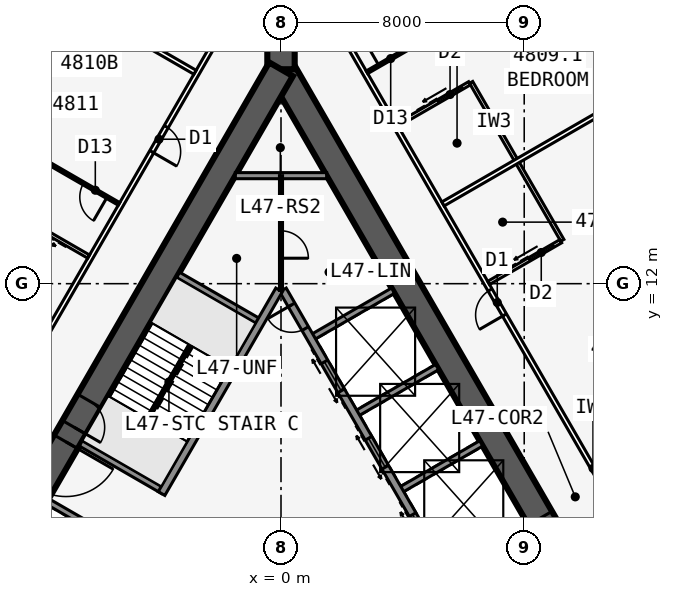
"""IFC4 building model, lengths in metres.
Left out: names, types, materials, properties, quantities, classifications, styles, units other than length and angle.
Written with IfcOpenShell. Run it as: python <this file> out.ifc"""

import sys

from ifc_helpers import new_model, si_unit, direction, frame, frame_2d, origin, place, context, subcontext, project, spatial, rectangle, extrude, element, fill, save


model = new_model("IFC4")
c1 = context("Model", 3, precision=1e-05, world=origin(), true_north=direction((0.0, 1.0)))
c2 = subcontext(c1, "Body", "Model", "MODEL_VIEW")
j1 = project(units=[si_unit("LENGTHUNIT", "METRE"), si_unit("PLANEANGLEUNIT", "RADIAN")], contexts=[c1])
p1 = place(None, origin())
s1 = spatial("IfcSite", under=j1, at=p1, CompositionType="ELEMENT")
p2 = place(p1, origin())
s2 = spatial("IfcBuilding", under=s1, at=p2, CompositionType="ELEMENT")
p3 = place(p2, frame((0.0, 0.0, 175.9)))
s3 = spatial("IfcBuildingStorey", under=s2, at=p3, CompositionType="ELEMENT", Elevation=175.9)
p4 = place(p3, frame((16.5, -9.526, 0.0), z_axis=(0.0, 0.0, 1.0), x_axis=(-0.499999749417, 0.866025548458, 0.0)))
e1 = element("IfcWall", 1, at=p4, inside=s3, PredefinedType="SHEAR", context=c2, shape_type="SweptSolid", body=[
    extrude(rectangle(XDim=33.0, YDim=0.9, at=frame_2d((16.5, 0.0))), origin(), (0.0, 0.0, 1.0), 3.4),
])
p5 = place(p4, frame((14.15, 0.0, 0.0)))
e2 = element("IfcOpeningElement", 2, at=p5, cuts=e1, PredefinedType="OPENING", context=c2, shape_type="SweptSolid", body=[
    extrude(rectangle(XDim=1.8, YDim=2.13, at=frame_2d((0.9, 1.065))), frame((0.0, 0.46, 0.0), z_axis=(0.0, -1.0, 0.0), x_axis=(1.0, 0.0, 0.0)), (0.0, 0.0, 1.0), 0.92),
])
p6 = place(p4, frame((12.6, 0.0, 0.0)))
e3 = element("IfcOpeningElement", 3, at=p6, cuts=e1, PredefinedType="OPENING", context=c2, shape_type="SweptSolid", body=[
    extrude(rectangle(XDim=1.0, YDim=2.13, at=frame_2d((0.5, 1.065))), frame((0.0, 0.46, 0.0), z_axis=(0.0, -1.0, 0.0), x_axis=(1.0, 0.0, 0.0)), (0.0, 0.0, 1.0), 0.92),
])
p7 = place(p3, frame((5.379, 2.586, 0.0), z_axis=(0.0, 0.0, 1.0), x_axis=(-0.500001375892, 0.866024609411, 0.0)))
e4 = element("IfcWall", 4, at=p7, inside=s3, PredefinedType="SOLIDWALL", context=c2, shape_type="SweptSolid", body=[
    extrude(rectangle(XDim=10.633, YDim=0.25, at=frame_2d((5.316, 0.0))), origin(), (0.0, 0.0, 1.0), 3.235),
])
p8 = place(p7, frame((9.164, 0.0, 0.0)))
e5 = element("IfcOpeningElement", 5, at=p8, cuts=e4, PredefinedType="OPENING", context=c2, shape_type="SweptSolid", body=[
    extrude(rectangle(XDim=0.9, YDim=2.13, at=frame_2d((0.45, 1.065))), frame((0.0, 0.135, 0.0), z_axis=(0.0, -1.0, 0.0), x_axis=(1.0, 0.0, 0.0)), (0.0, 0.0, 1.0), 0.27),
])
p9 = place(p7, frame((1.0, 0.0, 0.0)))
e6 = element("IfcOpeningElement", 6, at=p9, cuts=e4, PredefinedType="OPENING", context=c2, shape_type="SweptSolid", body=[
    extrude(rectangle(XDim=1.1, YDim=2.13, at=frame_2d((0.55, 1.065))), frame((0.0, 0.135, 0.0), z_axis=(0.0, -1.0, 0.0), x_axis=(1.0, 0.0, 0.0)), (0.0, 0.0, 1.0), 0.27),
])
p10 = place(p7, frame((3.9, 0.0, 0.0)))
e7 = element("IfcOpeningElement", 7, at=p10, cuts=e4, PredefinedType="OPENING", context=c2, shape_type="SweptSolid", body=[
    extrude(rectangle(XDim=1.1, YDim=2.13, at=frame_2d((0.55, 1.065))), frame((0.0, 0.135, 0.0), z_axis=(0.0, -1.0, 0.0), x_axis=(1.0, 0.0, 0.0)), (0.0, 0.0, 1.0), 0.27),
])
p11 = place(p7, frame((6.8, 0.0, 0.0)))
e8 = element("IfcOpeningElement", 8, at=p11, cuts=e4, PredefinedType="OPENING", context=c2, shape_type="SweptSolid", body=[
    extrude(rectangle(XDim=1.1, YDim=2.13, at=frame_2d((0.55, 1.065))), frame((0.0, 0.135, 0.0), z_axis=(0.0, -1.0, 0.0), x_axis=(1.0, 0.0, 0.0)), (0.0, 0.0, 1.0), 0.27),
])
for number, where, z_axis, x_axis in (
    (9, (3.879, 5.184, 0.0), (0.0, 0.0, 1.0), (0.866, 0.5, 0.0)),
    (10, (2.429, 7.696, 0.0), (0.0, 0.0, 1.0), (0.866, 0.5, 0.0)),
    (11, (0.979, 10.207, 0.0), (0.0, 0.0, 1.0), (0.866, 0.5, 0.0)),
):
    element("IfcWall", number, at=place(p3, frame(where, z_axis=z_axis, x_axis=x_axis)), inside=s3, PredefinedType="SOLIDWALL", context=c2, shape_type="SweptSolid", body=[
        extrude(rectangle(XDim=3.125, YDim=0.2, at=frame_2d((1.562, 0.0))), origin(), (0.0, 0.0, 1.0), 3.235),
    ])
p12 = place(p3, frame((0.0, 19.052, 0.0), z_axis=(0.0, 0.0, 1.0), x_axis=(-0.499999749417, -0.866025548458, 0.0)))
e12 = element("IfcWall", 12, at=p12, inside=s3, PredefinedType="SHEAR", context=c2, shape_type="SweptSolid", body=[
    extrude(rectangle(XDim=33.0, YDim=0.9, at=frame_2d((16.5, 0.0))), origin(), (0.0, 0.0, 1.0), 3.4),
])
p13 = place(p12, frame((14.15, 0.0, 0.0)))
e13 = element("IfcOpeningElement", 13, at=p13, cuts=e12, PredefinedType="OPENING", context=c2, shape_type="SweptSolid", body=[
    extrude(rectangle(XDim=1.8, YDim=2.13, at=frame_2d((0.9, 1.065))), frame((0.0, 0.46, 0.0), z_axis=(0.0, -1.0, 0.0), x_axis=(1.0, 0.0, 0.0)), (0.0, 0.0, 1.0), 0.92),
])
p14 = place(p12, frame((12.6, 0.0, 0.0)))
e14 = element("IfcOpeningElement", 14, at=p14, cuts=e12, PredefinedType="OPENING", context=c2, shape_type="SweptSolid", body=[
    extrude(rectangle(XDim=1.0, YDim=2.13, at=frame_2d((0.5, 1.065))), frame((0.0, 0.46, 0.0), z_axis=(0.0, -1.0, 0.0), x_axis=(1.0, 0.0, 0.0)), (0.0, 0.0, 1.0), 0.92),
])
p15 = place(p3, frame((-0.062, 11.794, 0.0), z_axis=(0.0, 0.0, 1.0), x_axis=(-0.500006680225, -0.86602154692, 0.0)))
e15 = element("IfcWall", 15, at=p15, inside=s3, PredefinedType="SOLIDWALL", context=c2, shape_type="SweptSolid", body=[
    extrude(rectangle(XDim=7.733, YDim=0.25, at=frame_2d((3.866, 0.0))), origin(), (0.0, 0.0, 1.0), 3.235),
])
for number, where, z_axis, x_axis in (
    (16, (-0.679, 10.727, 0.0), (0.0, 0.0, 1.0), (-0.866, 0.5, 0.0)),
    (17, (-3.879, 5.184, 0.0), (0.0, 0.0, 1.0), (-0.866, 0.5, 0.0)),
    (18, (-4.979, 3.279, 0.0), (0.0, 0.0, 1.0), (-0.866, 0.5, 0.0)),
):
    element("IfcWall", number, at=place(p3, frame(where, z_axis=z_axis, x_axis=x_axis)), inside=s3, PredefinedType="SOLIDWALL", context=c2, shape_type="SweptSolid", body=[
        extrude(rectangle(XDim=3.125, YDim=0.2, at=frame_2d((1.562, 0.0))), origin(), (0.0, 0.0, 1.0), 3.235),
    ])
p16 = place(p3, frame((0.0, 19.052, 0.0), z_axis=(0.0, 0.0, 1.0), x_axis=(0.0, 1.0, 0.0)))
e19 = element("IfcWall", 19, at=p16, inside=s3, PredefinedType="SHEAR", context=c2, shape_type="SweptSolid", body=[
    extrude(rectangle(XDim=4.746, YDim=0.9, at=frame_2d((2.373, 0.0))), origin(), (0.0, 0.0, 1.0), 3.4),
])
p17 = place(p16, frame((1.8, 0.0, 0.0)))
e20 = element("IfcOpeningElement", 20, at=p17, cuts=e19, PredefinedType="OPENING", context=c2, shape_type="SweptSolid", body=[
    extrude(rectangle(XDim=1.8, YDim=2.13, at=frame_2d((0.9, 1.065))), frame((0.0, 0.46, 0.0), z_axis=(0.0, -1.0, 0.0), x_axis=(1.0, 0.0, 0.0)), (0.0, 0.0, 1.0), 0.92),
])
p18 = place(p3, frame((12.723, 18.868, 0.0), z_axis=(0.0, 0.0, 1.0), x_axis=(-0.641810386606, 0.766863369607, 0.0)))
e21 = element("IfcWall", 21, at=p18, inside=s3, PredefinedType="STANDARD", context=c2, shape_type="SweptSolid", body=[
    extrude(rectangle(XDim=5.076, YDim=0.25, at=frame_2d((2.538, 0.0))), origin(), (0.0, 0.0, 1.0), 3.235),
])
p19 = place(p18, frame((0.738, 0.0, 0.45)))
e22 = element("IfcOpeningElement", 22, at=p19, cuts=e21, PredefinedType="OPENING", context=c2, shape_type="SweptSolid", body=[
    extrude(rectangle(XDim=3.6, YDim=2.4, at=frame_2d((1.8, 1.2))), frame((0.0, 0.135, 0.0), z_axis=(0.0, -1.0, 0.0), x_axis=(1.0, 0.0, 0.0)), (0.0, 0.0, 1.0), 0.27),
])
p20 = place(p3, frame((20.027, -10.985, 0.0), z_axis=(0.0, 0.0, 1.0), x_axis=(-0.500001677587, 0.866024435227, 0.0)))
e23 = element("IfcWall", 23, at=p20, inside=s3, PredefinedType="PARTITIONING", context=c2, shape_type="SweptSolid", body=[
    extrude(rectangle(XDim=39.054, YDim=0.15, at=frame_2d((19.527, 0.0))), origin(), (0.0, 0.0, 1.0), 3.235),
])
p21 = place(p20, frame((1.558, 0.0, 0.0)))
e24 = element("IfcOpeningElement", 24, at=p21, cuts=e23, PredefinedType="OPENING", context=c2, shape_type="SweptSolid", body=[
    extrude(rectangle(XDim=0.95, YDim=2.13, at=frame_2d((0.475, 1.065))), frame((0.0, 0.085, 0.0), z_axis=(0.0, -1.0, 0.0), x_axis=(1.0, 0.0, 0.0)), (0.0, 0.0, 1.0), 0.17),
])
p22 = place(p20, frame((11.552, 0.0, 0.0)))
e25 = element("IfcOpeningElement", 25, at=p22, cuts=e23, PredefinedType="OPENING", context=c2, shape_type="SweptSolid", body=[
    extrude(rectangle(XDim=0.95, YDim=2.13, at=frame_2d((0.475, 1.065))), frame((0.0, 0.085, 0.0), z_axis=(0.0, -1.0, 0.0), x_axis=(1.0, 0.0, 0.0)), (0.0, 0.0, 1.0), 0.17),
])
p23 = place(p20, frame((25.352, 0.0, 0.0)))
e26 = element("IfcOpeningElement", 26, at=p23, cuts=e23, PredefinedType="OPENING", context=c2, shape_type="SweptSolid", body=[
    extrude(rectangle(XDim=0.95, YDim=2.13, at=frame_2d((0.475, 1.065))), frame((0.0, 0.085, 0.0), z_axis=(0.0, -1.0, 0.0), x_axis=(1.0, 0.0, 0.0)), (0.0, 0.0, 1.0), 0.17),
])
p24 = place(p20, frame((36.546, 0.0, 0.0)))
e27 = element("IfcOpeningElement", 27, at=p24, cuts=e23, PredefinedType="OPENING", context=c2, shape_type="SweptSolid", body=[
    extrude(rectangle(XDim=0.95, YDim=2.13, at=frame_2d((0.475, 1.065))), frame((0.0, 0.085, 0.0), z_axis=(0.0, -1.0, 0.0), x_axis=(1.0, 0.0, 0.0)), (0.0, 0.0, 1.0), 0.17),
])
p25 = place(p3, frame((5.329, 14.623, 0.0), z_axis=(0.0, 0.0, 1.0), x_axis=(0.866011723728, 0.500023693804, 0.0)))
e28 = element("IfcWall", 28, at=p25, inside=s3, PredefinedType="PARTITIONING", context=c2, shape_type="SweptSolid", body=[
    extrude(rectangle(XDim=8.395, YDim=0.15, at=frame_2d((4.198, 0.0))), origin(), (0.0, 0.0, 1.0), 2.389),
])
p26 = place(p3, frame((2.829, 18.954, 0.0), z_axis=(0.0, 0.0, 1.0), x_axis=(0.866015739374, 0.500016738876, 0.0)))
e29 = element("IfcWall", 29, at=p26, inside=s3, PredefinedType="PARTITIONING", context=c2, shape_type="SweptSolid", body=[
    extrude(rectangle(XDim=7.516, YDim=0.1, at=frame_2d((3.758, 0.0))), origin(), (0.0, 0.0, 1.0), 2.389),
])
p27 = place(p26, frame((0.45, 0.0, 0.0)))
e30 = element("IfcOpeningElement", 30, at=p27, cuts=e29, PredefinedType="OPENING", context=c2, shape_type="SweptSolid", body=[
    extrude(rectangle(XDim=0.9, YDim=2.13, at=frame_2d((0.45, 1.065))), frame((0.0, 0.06, 0.0), z_axis=(0.0, -1.0, 0.0), x_axis=(1.0, 0.0, 0.0)), (0.0, 0.0, 1.0), 0.12),
])
p28 = place(p3, frame((9.253, 13.425, 0.0), z_axis=(0.0, 0.0, 1.0), x_axis=(-0.499990139034, 0.866031096941, 0.0)))
e31 = element("IfcWall", 31, at=p28, inside=s3, PredefinedType="PLUMBINGWALL", context=c2, shape_type="SweptSolid", body=[
    extrude(rectangle(XDim=3.0, YDim=0.12, at=frame_2d((1.5, 0.0))), origin(), (0.0, 0.0, 1.0), 3.235),
])
p29 = place(p3, frame((6.829, 12.025, 0.0), z_axis=(0.0, 0.0, 1.0), x_axis=(0.866035715982, 0.499982138324, 0.0)))
e32 = element("IfcWall", 32, at=p29, inside=s3, PredefinedType="PLUMBINGWALL", context=c2, shape_type="SweptSolid", body=[
    extrude(rectangle(XDim=2.74, YDim=0.12, at=frame_2d((1.37, 0.0))), origin(), (0.0, 0.0, 1.0), 3.235),
])
p30 = place(p29, frame((1.55, 0.0, 0.0)))
e33 = element("IfcOpeningElement", 33, at=p30, cuts=e32, PredefinedType="OPENING", context=c2, shape_type="SweptSolid", body=[
    extrude(rectangle(XDim=0.9, YDim=2.13, at=frame_2d((0.45, 1.065))), frame((0.0, 0.07, 0.0), z_axis=(0.0, -1.0, 0.0), x_axis=(1.0, 0.0, 0.0)), (0.0, 0.0, 1.0), 0.14),
])
p31 = place(p3, frame((7.753, 16.023, 0.0), z_axis=(0.0, 0.0, 1.0), x_axis=(-0.499990139034, 0.866031096941, 0.0)))
e34 = element("IfcWall", 34, at=p31, inside=s3, PredefinedType="PLUMBINGWALL", context=c2, shape_type="SweptSolid", body=[
    extrude(rectangle(XDim=3.0, YDim=0.12, at=frame_2d((1.5, 0.0))), origin(), (0.0, 0.0, 1.0), 3.235),
])
p32 = place(p3, frame((3.829, 17.221, 0.0), z_axis=(0.0, 0.0, 1.0), x_axis=(0.865997131366, 0.500048966069, 0.0)))
e35 = element("IfcWall", 35, at=p32, inside=s3, PredefinedType="PLUMBINGWALL", context=c2, shape_type="SweptSolid", body=[
    extrude(rectangle(XDim=2.74, YDim=0.12, at=frame_2d((1.37, 0.0))), origin(), (0.0, 0.0, 1.0), 3.235),
])
p33 = place(p32, frame((1.55, 0.0, 0.0)))
e36 = element("IfcOpeningElement", 36, at=p33, cuts=e35, PredefinedType="OPENING", context=c2, shape_type="SweptSolid", body=[
    extrude(rectangle(XDim=0.9, YDim=2.13, at=frame_2d((0.45, 1.065))), frame((0.0, 0.07, 0.0), z_axis=(0.0, -1.0, 0.0), x_axis=(1.0, 0.0, 0.0)), (0.0, 0.0, 1.0), 0.14),
])
p34 = place(p3, frame((-0.5, 22.836, 0.0), z_axis=(0.0, 0.0, 1.0), x_axis=(-0.500001677587, -0.866024435227, 0.0)))
e37 = element("IfcWall", 37, at=p34, inside=s3, PredefinedType="PARTITIONING", context=c2, shape_type="SweptSolid", body=[
    extrude(rectangle(XDim=39.054, YDim=0.15, at=frame_2d((19.527, 0.0))), origin(), (0.0, 0.0, 1.0), 3.235),
])
p35 = place(p34, frame((0.352, 0.0, 0.0)))
e38 = element("IfcOpeningElement", 38, at=p35, cuts=e37, PredefinedType="OPENING", context=c2, shape_type="SweptSolid", body=[
    extrude(rectangle(XDim=0.95, YDim=2.13, at=frame_2d((0.475, 1.065))), frame((0.0, 0.085, 0.0), z_axis=(0.0, -1.0, 0.0), x_axis=(1.0, 0.0, 0.0)), (0.0, 0.0, 1.0), 0.17),
])
p36 = place(p34, frame((6.552, 0.0, 0.0)))
e39 = element("IfcOpeningElement", 39, at=p36, cuts=e37, PredefinedType="OPENING", context=c2, shape_type="SweptSolid", body=[
    extrude(rectangle(XDim=0.95, YDim=2.13, at=frame_2d((0.475, 1.065))), frame((0.0, 0.085, 0.0), z_axis=(0.0, -1.0, 0.0), x_axis=(1.0, 0.0, 0.0)), (0.0, 0.0, 1.0), 0.17),
])
p37 = place(p34, frame((15.952, 0.0, 0.0)))
e40 = element("IfcOpeningElement", 40, at=p37, cuts=e37, PredefinedType="OPENING", context=c2, shape_type="SweptSolid", body=[
    extrude(rectangle(XDim=0.95, YDim=2.13, at=frame_2d((0.475, 1.065))), frame((0.0, 0.085, 0.0), z_axis=(0.0, -1.0, 0.0), x_axis=(1.0, 0.0, 0.0)), (0.0, 0.0, 1.0), 0.17),
])
p38 = place(p34, frame((21.552, 0.0, 0.0)))
e41 = element("IfcOpeningElement", 41, at=p38, cuts=e37, PredefinedType="OPENING", context=c2, shape_type="SweptSolid", body=[
    extrude(rectangle(XDim=0.95, YDim=2.13, at=frame_2d((0.475, 1.065))), frame((0.0, 0.085, 0.0), z_axis=(0.0, -1.0, 0.0), x_axis=(1.0, 0.0, 0.0)), (0.0, 0.0, 1.0), 0.17),
])
p39 = place(p34, frame((30.952, 0.0, 0.0)))
e42 = element("IfcOpeningElement", 42, at=p39, cuts=e37, PredefinedType="OPENING", context=c2, shape_type="SweptSolid", body=[
    extrude(rectangle(XDim=0.95, YDim=2.13, at=frame_2d((0.475, 1.065))), frame((0.0, 0.085, 0.0), z_axis=(0.0, -1.0, 0.0), x_axis=(1.0, 0.0, 0.0)), (0.0, 0.0, 1.0), 0.17),
])
p40 = place(p34, frame((37.752, 0.0, 0.0)))
e43 = element("IfcOpeningElement", 43, at=p40, cuts=e37, PredefinedType="OPENING", context=c2, shape_type="SweptSolid", body=[
    extrude(rectangle(XDim=0.95, YDim=2.13, at=frame_2d((0.475, 1.065))), frame((0.0, 0.085, 0.0), z_axis=(0.0, -1.0, 0.0), x_axis=(1.0, 0.0, 0.0)), (0.0, 0.0, 1.0), 0.17),
])
p41 = place(p3, frame((-2.829, 18.954, 0.0), z_axis=(0.0, 0.0, 1.0), x_axis=(-0.866015739374, 0.500016738876, 0.0)))
e44 = element("IfcWall", 44, at=p41, inside=s3, PredefinedType="PARTITIONING", context=c2, shape_type="SweptSolid", body=[
    extrude(rectangle(XDim=7.516, YDim=0.15, at=frame_2d((3.758, 0.0))), origin(), (0.0, 0.0, 1.0), 2.389),
])
p42 = place(p3, frame((-5.329, 14.623, 0.0), z_axis=(0.0, 0.0, 1.0), x_axis=(-0.866011723728, 0.500023693804, 0.0)))
e45 = element("IfcWall", 45, at=p42, inside=s3, PredefinedType="PARTITIONING", context=c2, shape_type="SweptSolid", body=[
    extrude(rectangle(XDim=8.395, YDim=0.1, at=frame_2d((4.198, 0.0))), origin(), (0.0, 0.0, 1.0), 2.389),
])
p43 = place(p42, frame((0.45, 0.0, 0.0)))
e46 = element("IfcOpeningElement", 46, at=p43, cuts=e45, PredefinedType="OPENING", context=c2, shape_type="SweptSolid", body=[
    extrude(rectangle(XDim=0.9, YDim=2.13, at=frame_2d((0.45, 1.065))), frame((0.0, 0.06, 0.0), z_axis=(0.0, -1.0, 0.0), x_axis=(1.0, 0.0, 0.0)), (0.0, 0.0, 1.0), 0.12),
])
p44 = place(p3, frame((-6.329, 12.891, 0.0), z_axis=(0.0, 0.0, 1.0), x_axis=(-0.866035715982, 0.499982138324, 0.0)))
e47 = element("IfcWall", 47, at=p44, inside=s3, PredefinedType="PLUMBINGWALL", context=c2, shape_type="SweptSolid", body=[
    extrude(rectangle(XDim=2.74, YDim=0.12, at=frame_2d((1.37, 0.0))), origin(), (0.0, 0.0, 1.0), 3.235),
])
p45 = place(p44, frame((1.55, 0.0, 0.0)))
e48 = element("IfcOpeningElement", 48, at=p45, cuts=e47, PredefinedType="OPENING", context=c2, shape_type="SweptSolid", body=[
    extrude(rectangle(XDim=0.9, YDim=2.13, at=frame_2d((0.45, 1.065))), frame((0.0, 0.07, 0.0), z_axis=(0.0, -1.0, 0.0), x_axis=(1.0, 0.0, 0.0)), (0.0, 0.0, 1.0), 0.14),
])
p46 = place(p3, frame((-1.501, 15.552, 0.0), z_axis=(0.0, 0.0, 1.0), x_axis=(1.0, 0.0, 0.0)))
e49 = element("IfcWall", 49, at=p46, inside=s3, PredefinedType="SOLIDWALL", context=c2, shape_type="SweptSolid", body=[
    extrude(rectangle(XDim=3.002, YDim=0.2, at=frame_2d((1.501, 0.0))), origin(), (0.0, 0.0, 1.0), 3.235),
])
p47 = place(p3, frame((0.0, 15.552, 0.0), z_axis=(0.0, 0.0, 1.0), x_axis=(0.0, -1.0, 0.0)))
e50 = element("IfcWall", 50, at=p47, inside=s3, PredefinedType="PARTITIONING", context=c2, shape_type="SweptSolid", body=[
    extrude(rectangle(XDim=3.775, YDim=0.1, at=frame_2d((1.888, 0.0))), origin(), (0.0, 0.0, 1.0), 3.235),
])
p48 = place(p47, frame((1.815, 0.0, 0.0)))
e51 = element("IfcOpeningElement", 51, at=p48, cuts=e50, PredefinedType="OPENING", context=c2, shape_type="SweptSolid", body=[
    extrude(rectangle(XDim=0.9, YDim=2.13, at=frame_2d((0.45, 1.065))), frame((0.0, 0.06, 0.0), z_axis=(0.0, -1.0, 0.0), x_axis=(1.0, 0.0, 0.0)), (0.0, 0.0, 1.0), 0.12),
])
p49 = place(p3, frame((-2.988, 9.978, 0.0), z_axis=(0.0, 0.0, 1.0), x_axis=(-0.499992232847, -0.866029888106, 0.0)))
e52 = element("IfcWall", 52, at=p49, inside=s3, PredefinedType="SOLIDWALL", context=c2, shape_type="SweptSolid", body=[
    extrude(rectangle(XDim=2.794, YDim=0.1, at=frame_2d((1.397, 0.0))), origin(), (0.0, 0.0, 1.0), 3.4),
])
p50 = place(p19, origin())
e53 = element("IfcWindow", 53, at=p50, inside=s3, PartitioningType="SINGLE_PANEL", PredefinedType="WINDOW", context=c2, shape_type="SweptSolid", body=[
    extrude(rectangle(XDim=3.6, YDim=2.4, at=frame_2d((1.8, 1.2))), frame((0.0, 0.03, 0.0), z_axis=(0.0, -1.0, 0.0), x_axis=(1.0, 0.0, 0.0)), (0.0, 0.0, 1.0), 0.06),
])
fill(e22, e53)
p51 = place(p27, origin())
e54 = element("IfcDoor", 54, at=p51, inside=s3, OperationType="SINGLE_SWING_LEFT", PredefinedType="DOOR", context=c2, shape_type="SweptSolid", body=[
    extrude(rectangle(XDim=0.9, YDim=2.13, at=frame_2d((0.45, 1.065))), frame((0.0, 0.025, 0.0), z_axis=(0.0, -1.0, 0.0), x_axis=(1.0, 0.0, 0.0)), (0.0, 0.0, 1.0), 0.05),
])
fill(e30, e54)
p52 = place(p30, origin())
e55 = element("IfcDoor", 55, at=p52, inside=s3, OperationType="SLIDING_TO_LEFT", PredefinedType="DOOR", context=c2, shape_type="SweptSolid", body=[
    extrude(rectangle(XDim=0.9, YDim=2.13, at=frame_2d((0.45, 1.065))), frame((0.0, 0.025, 0.0), z_axis=(0.0, -1.0, 0.0), x_axis=(1.0, 0.0, 0.0)), (0.0, 0.0, 1.0), 0.05),
])
fill(e33, e55)
p53 = place(p23, origin())
e56 = element("IfcDoor", 56, at=p53, inside=s3, OperationType="SINGLE_SWING_LEFT", PredefinedType="DOOR", context=c2, shape_type="SweptSolid", body=[
    extrude(rectangle(XDim=0.95, YDim=2.13, at=frame_2d((0.475, 1.065))), frame((0.0, 0.025, 0.0), z_axis=(0.0, -1.0, 0.0), x_axis=(1.0, 0.0, 0.0)), (0.0, 0.0, 1.0), 0.05),
])
fill(e26, e56)
p54 = place(p33, origin())
e57 = element("IfcDoor", 57, at=p54, inside=s3, OperationType="SLIDING_TO_LEFT", PredefinedType="DOOR", context=c2, shape_type="SweptSolid", body=[
    extrude(rectangle(XDim=0.9, YDim=2.13, at=frame_2d((0.45, 1.065))), frame((0.0, 0.025, 0.0), z_axis=(0.0, -1.0, 0.0), x_axis=(1.0, 0.0, 0.0)), (0.0, 0.0, 1.0), 0.05),
])
fill(e36, e57)
p55 = place(p43, origin())
e58 = element("IfcDoor", 58, at=p55, inside=s3, OperationType="SINGLE_SWING_LEFT", PredefinedType="DOOR", context=c2, shape_type="SweptSolid", body=[
    extrude(rectangle(XDim=0.9, YDim=2.13, at=frame_2d((0.45, 1.065))), frame((0.0, 0.025, 0.0), z_axis=(0.0, -1.0, 0.0), x_axis=(1.0, 0.0, 0.0)), (0.0, 0.0, 1.0), 0.05),
])
fill(e46, e58)
p56 = place(p36, origin())
e59 = element("IfcDoor", 59, at=p56, inside=s3, OperationType="SINGLE_SWING_RIGHT", PredefinedType="DOOR", context=c2, shape_type="SweptSolid", body=[
    extrude(rectangle(XDim=0.95, YDim=2.13, at=frame_2d((0.475, 1.065))), frame((0.0, 0.025, 0.0), z_axis=(0.0, -1.0, 0.0), x_axis=(1.0, 0.0, 0.0)), (0.0, 0.0, 1.0), 0.05),
])
fill(e39, e59)
p57 = place(p13, origin())
e60 = element("IfcDoor", 60, at=p57, inside=s3, OperationType="DOUBLE_DOOR_SINGLE_SWING", PredefinedType="DOOR", context=c2, shape_type="SweptSolid", body=[
    extrude(rectangle(XDim=1.8, YDim=2.13, at=frame_2d((0.9, 1.065))), frame((0.0, 0.025, 0.0), z_axis=(0.0, -1.0, 0.0), x_axis=(1.0, 0.0, 0.0)), (0.0, 0.0, 1.0), 0.05),
])
fill(e13, e60)
p58 = place(p14, origin())
e61 = element("IfcDoor", 61, at=p58, inside=s3, OperationType="SINGLE_SWING_RIGHT", PredefinedType="DOOR", context=c2, shape_type="SweptSolid", body=[
    extrude(rectangle(XDim=1.0, YDim=2.13, at=frame_2d((0.5, 1.065))), frame((0.0, 0.025, 0.0), z_axis=(0.0, -1.0, 0.0), x_axis=(1.0, 0.0, 0.0)), (0.0, 0.0, 1.0), 0.05),
])
fill(e14, e61)
p59 = place(p8, origin())
e62 = element("IfcDoor", 62, at=p59, inside=s3, OperationType="SINGLE_SWING_RIGHT", PredefinedType="DOOR", context=c2, shape_type="SweptSolid", body=[
    extrude(rectangle(XDim=0.9, YDim=2.13, at=frame_2d((0.45, 1.065))), frame((0.0, 0.025, 0.0), z_axis=(0.0, -1.0, 0.0), x_axis=(1.0, 0.0, 0.0)), (0.0, 0.0, 1.0), 0.05),
])
fill(e5, e62)
p60 = place(p48, origin())
e63 = element("IfcDoor", 63, at=p60, inside=s3, OperationType="SINGLE_SWING_RIGHT", PredefinedType="DOOR", context=c2, shape_type="SweptSolid", body=[
    extrude(rectangle(XDim=0.9, YDim=2.13, at=frame_2d((0.45, 1.065))), frame((0.0, 0.025, 0.0), z_axis=(0.0, -1.0, 0.0), x_axis=(1.0, 0.0, 0.0)), (0.0, 0.0, 1.0), 0.05),
])
fill(e51, e63)
p61 = place(p9, origin())
e64 = element("IfcDoor", 64, at=p61, inside=s3, OperationType="DOUBLE_DOOR_SLIDING", PredefinedType="USERDEFINED", context=c2, shape_type="SweptSolid", body=[
    extrude(rectangle(XDim=1.1, YDim=2.13, at=frame_2d((0.55, 1.065))), frame((0.0, 0.025, 0.0), z_axis=(0.0, -1.0, 0.0), x_axis=(1.0, 0.0, 0.0)), (0.0, 0.0, 1.0), 0.05),
])
fill(e6, e64)
p62 = place(p10, origin())
e65 = element("IfcDoor", 65, at=p62, inside=s3, OperationType="DOUBLE_DOOR_SLIDING", PredefinedType="USERDEFINED", context=c2, shape_type="SweptSolid", body=[
    extrude(rectangle(XDim=1.1, YDim=2.13, at=frame_2d((0.55, 1.065))), frame((0.0, 0.025, 0.0), z_axis=(0.0, -1.0, 0.0), x_axis=(1.0, 0.0, 0.0)), (0.0, 0.0, 1.0), 0.05),
])
fill(e7, e65)
p63 = place(p11, origin())
e66 = element("IfcDoor", 66, at=p63, inside=s3, OperationType="DOUBLE_DOOR_SLIDING", PredefinedType="USERDEFINED", context=c2, shape_type="SweptSolid", body=[
    extrude(rectangle(XDim=1.1, YDim=2.13, at=frame_2d((0.55, 1.065))), frame((0.0, 0.025, 0.0), z_axis=(0.0, -1.0, 0.0), x_axis=(1.0, 0.0, 0.0)), (0.0, 0.0, 1.0), 0.05),
])
fill(e8, e66)
save(model, sys.argv[1])
